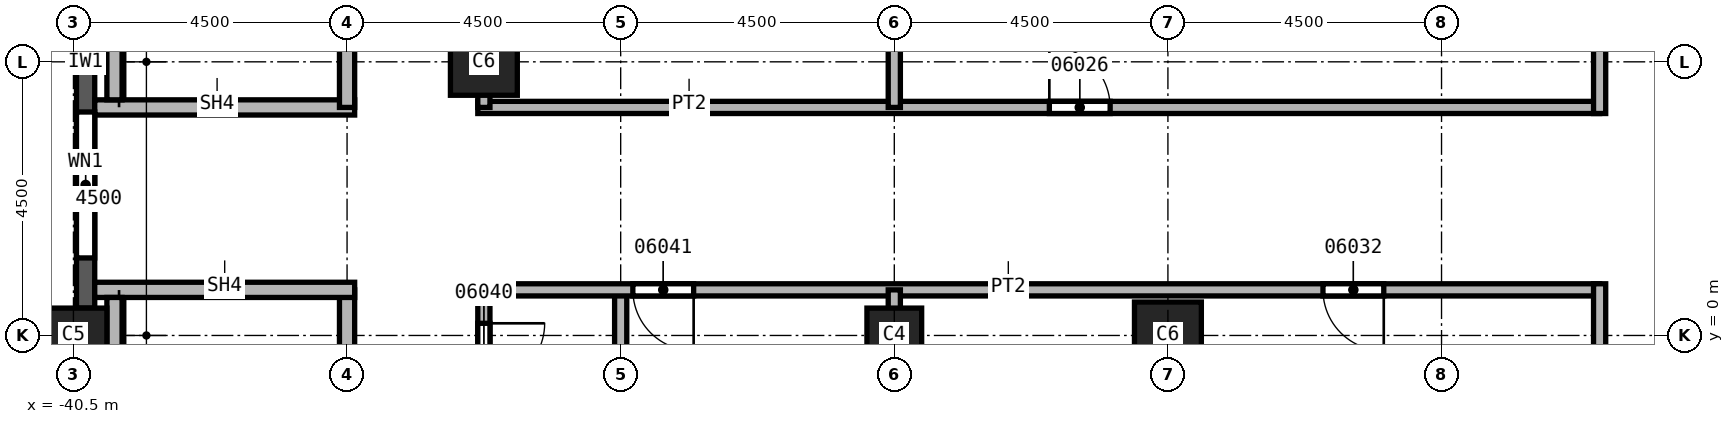
"""IFC4 building model, lengths in metres.
Left out: names, types, materials, properties, quantities, classifications, styles, units other than length and angle.
Written with IfcOpenShell. Run it as: python <this file> out.ifc"""

import sys

from ifc_helpers import new_model, si_unit, direction, frame, frame_2d, origin, origin_2d, place, context, subcontext, project, spatial, rectangle, extrude, element, fill, save


model = new_model("IFC4")
c1 = context("Model", 3, precision=1e-05, world=origin(), true_north=direction((0.0, 1.0)))
c2 = subcontext(c1, "Body", "Model", "MODEL_VIEW")
j1 = project(units=[si_unit("LENGTHUNIT", "METRE"), si_unit("PLANEANGLEUNIT", "RADIAN")], contexts=[c1])
p1 = place(None, origin())
s1 = spatial("IfcSite", under=j1, at=p1, CompositionType="ELEMENT")
p2 = place(p1, origin())
s2 = spatial("IfcBuilding", under=s1, at=p2, CompositionType="ELEMENT")
p3 = place(p2, frame((0.0, 0.0, 126.0)))
s3 = spatial("IfcBuildingStorey", under=s2, at=p3, CompositionType="ELEMENT", Elevation=126.0)
p4 = place(p3, frame((-40.5, 0.0, 0.0), z_axis=(0.0, 0.0, 1.0), x_axis=(0.0, 1.0, 0.0)))
e1 = element("IfcColumn", 1, at=p4, inside=s3, PredefinedType="COLUMN", context=c2, shape_type="SweptSolid", body=[
    extrude(rectangle(XDim=0.9, YDim=1.1, at=origin_2d()), origin(), (0.0, 0.0, 1.0), 3.7),
])
for number, where, z_axis, x_axis in (
    (2, (-33.75, 4.5, 0.0), (0.0, 0.0, 1.0), (1.0, 0.0, 0.0)),
    (3, (-22.5, 0.0, 0.0), (0.0, 0.0, 1.0), (1.0, 0.0, 0.0)),
):
    element("IfcColumn", number, at=place(p3, frame(where, z_axis=z_axis, x_axis=x_axis)), inside=s3, PredefinedType="COLUMN", context=c2, shape_type="SweptSolid", body=[
        extrude(rectangle(XDim=1.1, YDim=1.1, at=origin_2d()), origin(), (0.0, 0.0, 1.0), 3.7),
    ])
p5 = place(p3, frame((-27.0, 0.0, 0.0), z_axis=(0.0, 0.0, 1.0), x_axis=(1.0, 0.0, 0.0)))
e4 = element("IfcColumn", 4, at=p5, inside=s3, PredefinedType="COLUMN", context=c2, shape_type="SweptSolid", body=[
    extrude(rectangle(XDim=0.9, YDim=0.9, at=origin_2d()), origin(), (0.0, 0.0, 1.0), 3.7),
])
p6 = place(p3, frame((-40.3, 8.55, 0.0), z_axis=(0.0, 0.0, 1.0), x_axis=(0.0, -1.0, 0.0)))
e5 = element("IfcWall", 5, at=p6, inside=s3, PredefinedType="SOLIDWALL", context=c2, shape_type="SweptSolid", body=[
    extrude(rectangle(XDim=8.1, YDim=0.3, at=frame_2d((4.05, 0.0))), origin(), (0.0, 0.0, 1.0), 3.1),
])
p7 = place(p6, frame((0.825, 0.0, 0.8)))
e6 = element("IfcOpeningElement", 6, at=p7, cuts=e5, PredefinedType="OPENING", context=c2, shape_type="SweptSolid", body=[
    extrude(rectangle(XDim=2.4, YDim=1.95, at=frame_2d((1.2, 0.975))), frame((0.0, 0.15, 0.0), z_axis=(0.0, -1.0, 0.0), x_axis=(1.0, 0.0, 0.0)), (0.0, 0.0, 1.0), 0.3),
])
p8 = place(p6, frame((4.875, 0.0, 0.8)))
e7 = element("IfcOpeningElement", 7, at=p8, cuts=e5, PredefinedType="OPENING", context=c2, shape_type="SweptSolid", body=[
    extrude(rectangle(XDim=2.4, YDim=1.95, at=frame_2d((1.2, 0.975))), frame((0.0, 0.15, 0.0), z_axis=(0.0, -1.0, 0.0), x_axis=(1.0, 0.0, 0.0)), (0.0, 0.0, 1.0), 0.3),
])
p9 = place(p3, frame((-33.85, 3.75, 0.0), z_axis=(0.0, 0.0, 1.0), x_axis=(1.0, 0.0, 0.0)))
e8 = element("IfcWall", 8, at=p9, inside=s3, PredefinedType="PARTITIONING", context=c2, shape_type="SweptSolid", body=[
    extrude(rectangle(XDim=18.45, YDim=0.2, at=frame_2d((9.225, 0.0))), origin(), (0.0, 0.0, 1.0), 3.7),
])
p10 = place(p9, frame((9.4, 0.0, 0.0)))
e9 = element("IfcOpeningElement", 9, at=p10, cuts=e8, PredefinedType="OPENING", context=c2, shape_type="SweptSolid", body=[
    extrude(rectangle(XDim=1.0, YDim=2.1, at=frame_2d((0.5, 1.05))), frame((0.0, 0.1, 0.0), z_axis=(0.0, -1.0, 0.0), x_axis=(1.0, 0.0, 0.0)), (0.0, 0.0, 1.0), 0.2),
])
p11 = place(p3, frame((-33.75, 0.75, 0.0), z_axis=(0.0, 0.0, 1.0), x_axis=(0.0, -1.0, 0.0)))
e10 = element("IfcWall", 10, at=p11, inside=s3, PredefinedType="PARTITIONING", context=c2, shape_type="SweptSolid", body=[
    extrude(rectangle(XDim=7.6, YDim=0.2, at=frame_2d((3.8, 0.0))), origin(), (0.0, 0.0, 1.0), 3.7),
])
p12 = place(p11, frame((0.55, 0.0, 0.0)))
e11 = element("IfcOpeningElement", 11, at=p12, cuts=e10, PredefinedType="OPENING", context=c2, shape_type="SweptSolid", body=[
    extrude(rectangle(XDim=1.0, YDim=2.1, at=frame_2d((0.5, 1.05))), frame((0.0, 0.1, 0.0), z_axis=(0.0, -1.0, 0.0), x_axis=(1.0, 0.0, 0.0)), (0.0, 0.0, 1.0), 0.2),
])
p13 = place(p3, frame((-33.75, 11.25, 0.0), z_axis=(0.0, 0.0, 1.0), x_axis=(0.0, -1.0, 0.0)))
e12 = element("IfcWall", 12, at=p13, inside=s3, PredefinedType="PARTITIONING", context=c2, shape_type="SweptSolid", body=[
    extrude(rectangle(XDim=7.5, YDim=0.2, at=frame_2d((3.75, 0.0))), origin(), (0.0, 0.0, 1.0), 3.7),
])
p14 = place(p13, frame((1.45, 0.0, 0.0)))
e13 = element("IfcOpeningElement", 13, at=p14, cuts=e12, PredefinedType="OPENING", context=c2, shape_type="SweptSolid", body=[
    extrude(rectangle(XDim=1.0, YDim=2.1, at=frame_2d((0.5, 1.05))), frame((0.0, 0.1, 0.0), z_axis=(0.0, -1.0, 0.0), x_axis=(1.0, 0.0, 0.0)), (0.0, 0.0, 1.0), 0.2),
])
p15 = place(p3, frame((-31.5, 0.75, 0.0), z_axis=(0.0, 0.0, 1.0), x_axis=(0.0, -1.0, 0.0)))
e14 = element("IfcWall", 14, at=p15, inside=s3, PredefinedType="PARTITIONING", context=c2, shape_type="SweptSolid", body=[
    extrude(rectangle(XDim=18.2, YDim=0.2, at=frame_2d((9.1, 0.0))), origin(), (0.0, 0.0, 1.0), 3.7),
])
p16 = place(p3, frame((-15.4, 0.75, 0.0), z_axis=(0.0, 0.0, 1.0), x_axis=(-1.0, 0.0, 0.0)))
e15 = element("IfcWall", 15, at=p16, inside=s3, PredefinedType="PARTITIONING", context=c2, shape_type="SweptSolid", body=[
    extrude(rectangle(XDim=18.45, YDim=0.2, at=frame_2d((9.225, 0.0))), origin(), (0.0, 0.0, 1.0), 3.7),
])
p17 = place(p16, frame((3.55, 0.0, 0.0)))
e16 = element("IfcOpeningElement", 16, at=p17, cuts=e15, PredefinedType="OPENING", context=c2, shape_type="SweptSolid", body=[
    extrude(rectangle(XDim=1.0, YDim=2.1, at=frame_2d((0.5, 1.05))), frame((0.0, 0.1, 0.0), z_axis=(0.0, -1.0, 0.0), x_axis=(1.0, 0.0, 0.0)), (0.0, 0.0, 1.0), 0.2),
])
p18 = place(p16, frame((14.9, 0.0, 0.0)))
e17 = element("IfcOpeningElement", 17, at=p18, cuts=e15, PredefinedType="OPENING", context=c2, shape_type="SweptSolid", body=[
    extrude(rectangle(XDim=1.0, YDim=2.1, at=frame_2d((0.5, 1.05))), frame((0.0, 0.1, 0.0), z_axis=(0.0, -1.0, 0.0), x_axis=(1.0, 0.0, 0.0)), (0.0, 0.0, 1.0), 0.2),
])
p19 = place(p3, frame((-27.0, -17.45, 0.0), z_axis=(0.0, 0.0, 1.0), x_axis=(0.0, 1.0, 0.0)))
e18 = element("IfcWall", 18, at=p19, inside=s3, PredefinedType="PARTITIONING", context=c2, shape_type="SweptSolid", body=[
    extrude(rectangle(XDim=18.2, YDim=0.2, at=frame_2d((9.1, 0.0))), origin(), (0.0, 0.0, 1.0), 3.7),
])
p20 = place(p3, frame((-27.0, 3.75, 0.0), z_axis=(0.0, 0.0, 1.0), x_axis=(0.0, 1.0, 0.0)))
e19 = element("IfcWall", 19, at=p20, inside=s3, PredefinedType="PARTITIONING", context=c2, shape_type="SweptSolid", body=[
    extrude(rectangle(XDim=13.7, YDim=0.2, at=frame_2d((6.85, 0.0))), origin(), (0.0, 0.0, 1.0), 3.7),
])
p21 = place(p3, frame((-15.4, -23.25, 0.0), z_axis=(0.0, 0.0, 1.0), x_axis=(0.0, 1.0, 0.0)))
e20 = element("IfcWall", 20, at=p21, inside=s3, PredefinedType="PARTITIONING", context=c2, shape_type="SweptSolid", body=[
    extrude(rectangle(XDim=24.1, YDim=0.2, at=frame_2d((12.05, 0.0))), origin(), (0.0, 0.0, 1.0), 3.7),
])
p22 = place(p21, frame((4.6, 0.0, 0.0)))
e21 = element("IfcOpeningElement", 21, at=p22, cuts=e20, PredefinedType="OPENING", context=c2, shape_type="SweptSolid", body=[
    extrude(rectangle(XDim=1.0, YDim=2.1, at=frame_2d((0.5, 1.05))), frame((0.0, 0.1, 0.0), z_axis=(0.0, -1.0, 0.0), x_axis=(1.0, 0.0, 0.0)), (0.0, 0.0, 1.0), 0.2),
])
p23 = place(p21, frame((11.8, 0.0, 0.0)))
e22 = element("IfcOpeningElement", 22, at=p23, cuts=e20, PredefinedType="OPENING", context=c2, shape_type="SweptSolid", body=[
    extrude(rectangle(XDim=1.0, YDim=2.1, at=frame_2d((0.5, 1.05))), frame((0.0, 0.1, 0.0), z_axis=(0.0, -1.0, 0.0), x_axis=(1.0, 0.0, 0.0)), (0.0, 0.0, 1.0), 0.2),
])
p24 = place(p21, frame((16.95, 0.0, 0.0)))
e23 = element("IfcOpeningElement", 23, at=p24, cuts=e20, PredefinedType="OPENING", context=c2, shape_type="SweptSolid", body=[
    extrude(rectangle(XDim=1.0, YDim=2.1, at=frame_2d((0.5, 1.05))), frame((0.0, 0.1, 0.0), z_axis=(0.0, -1.0, 0.0), x_axis=(1.0, 0.0, 0.0)), (0.0, 0.0, 1.0), 0.2),
])
p25 = place(p3, frame((-15.4, 3.65, 0.0), z_axis=(0.0, 0.0, 1.0), x_axis=(0.0, 1.0, 0.0)))
e24 = element("IfcWall", 24, at=p25, inside=s3, PredefinedType="PARTITIONING", context=c2, shape_type="SweptSolid", body=[
    extrude(rectangle(XDim=9.95, YDim=0.2, at=frame_2d((4.975, 0.0))), origin(), (0.0, 0.0, 1.0), 3.7),
])
p26 = place(p3, frame((-40.15, 3.75, 0.0), z_axis=(0.0, 0.0, 1.0), x_axis=(1.0, 0.0, 0.0)))
e25 = element("IfcWall", 25, at=p26, inside=s3, PredefinedType="SOLIDWALL", context=c2, shape_type="SweptSolid", body=[
    extrude(rectangle(XDim=4.275, YDim=0.25, at=frame_2d((2.137, 0.0))), origin(), (0.0, 0.0, 1.0), 3.7),
])
p27 = place(p3, frame((-36.0, 0.75, 0.0), z_axis=(0.0, 0.0, 1.0), x_axis=(0.0, -1.0, 0.0)))
e26 = element("IfcWall", 26, at=p27, inside=s3, PredefinedType="SOLIDWALL", context=c2, shape_type="SweptSolid", body=[
    extrude(rectangle(XDim=7.625, YDim=0.25, at=frame_2d((3.812, 0.0))), origin(), (0.0, 0.0, 1.0), 3.7),
])
p28 = place(p27, frame((5.95, 0.0, 0.0)))
e27 = element("IfcOpeningElement", 27, at=p28, cuts=e26, PredefinedType="OPENING", context=c2, shape_type="SweptSolid", body=[
    extrude(rectangle(XDim=1.2, YDim=2.1, at=frame_2d((0.6, 1.05))), frame((0.0, 0.125, 0.0), z_axis=(0.0, -1.0, 0.0), x_axis=(1.0, 0.0, 0.0)), (0.0, 0.0, 1.0), 0.25),
])
p29 = place(p3, frame((-36.0, 11.375, 0.0), z_axis=(0.0, 0.0, 1.0), x_axis=(0.0, -1.0, 0.0)))
e28 = element("IfcWall", 28, at=p29, inside=s3, PredefinedType="SOLIDWALL", context=c2, shape_type="SweptSolid", body=[
    extrude(rectangle(XDim=7.625, YDim=0.25, at=frame_2d((3.812, 0.0))), origin(), (0.0, 0.0, 1.0), 3.7),
])
p30 = place(p29, frame((0.4, 0.0, 0.0)))
e29 = element("IfcOpeningElement", 29, at=p30, cuts=e28, PredefinedType="OPENING", context=c2, shape_type="SweptSolid", body=[
    extrude(rectangle(XDim=1.2, YDim=2.1, at=frame_2d((0.6, 1.05))), frame((0.0, 0.125, 0.0), z_axis=(0.0, -1.0, 0.0), x_axis=(1.0, 0.0, 0.0)), (0.0, 0.0, 1.0), 0.25),
])
p31 = place(p3, frame((-35.875, 0.75, 0.0), z_axis=(0.0, 0.0, 1.0), x_axis=(-1.0, 0.0, 0.0)))
e30 = element("IfcWall", 30, at=p31, inside=s3, PredefinedType="SOLIDWALL", context=c2, shape_type="SweptSolid", body=[
    extrude(rectangle(XDim=4.275, YDim=0.25, at=frame_2d((2.137, 0.0))), origin(), (0.0, 0.0, 1.0), 3.7),
])
for number, where, z_axis, x_axis in (
    (31, (-39.825, 3.875, 0.0), (0.0, 0.0, 1.0), (0.0, 1.0, 0.0)),
    (32, (-39.825, -6.625, 0.0), (0.0, 0.0, 1.0), (0.0, 1.0, 0.0)),
):
    element("IfcWall", number, at=place(p3, frame(where, z_axis=z_axis, x_axis=x_axis)), inside=s3, PredefinedType="SOLIDWALL", context=c2, shape_type="SweptSolid", body=[
        extrude(rectangle(XDim=7.25, YDim=0.25, at=frame_2d((3.625, 0.0))), origin(), (0.0, 0.0, 1.0), 3.7),
    ])
p32 = place(p8, origin())
e33 = element("IfcWindow", 33, at=p32, inside=s3, PartitioningType="SINGLE_PANEL", PredefinedType="WINDOW", context=c2, shape_type="SweptSolid", body=[
    extrude(rectangle(XDim=2.4, YDim=1.95, at=frame_2d((1.2, 0.975))), frame((0.0, 0.03, 0.0), z_axis=(0.0, -1.0, 0.0), x_axis=(1.0, 0.0, 0.0)), (0.0, 0.0, 1.0), 0.06),
])
fill(e7, e33)
p33 = place(p10, origin())
e34 = element("IfcDoor", 34, at=p33, inside=s3, OperationType="SINGLE_SWING_LEFT", PredefinedType="DOOR", context=c2, shape_type="SweptSolid", body=[
    extrude(rectangle(XDim=1.0, YDim=2.1, at=frame_2d((0.5, 1.05))), frame((0.0, 0.025, 0.0), z_axis=(0.0, -1.0, 0.0), x_axis=(1.0, 0.0, 0.0)), (0.0, 0.0, 1.0), 0.05),
])
fill(e9, e34)
p34 = place(p17, origin())
e35 = element("IfcDoor", 35, at=p34, inside=s3, OperationType="SINGLE_SWING_LEFT", PredefinedType="DOOR", context=c2, shape_type="SweptSolid", body=[
    extrude(rectangle(XDim=1.0, YDim=2.1, at=frame_2d((0.5, 1.05))), frame((0.0, 0.025, 0.0), z_axis=(0.0, -1.0, 0.0), x_axis=(1.0, 0.0, 0.0)), (0.0, 0.0, 1.0), 0.05),
])
fill(e16, e35)
p35 = place(p12, origin())
e36 = element("IfcDoor", 36, at=p35, inside=s3, OperationType="SINGLE_SWING_LEFT", PredefinedType="DOOR", context=c2, shape_type="SweptSolid", body=[
    extrude(rectangle(XDim=1.0, YDim=2.1, at=frame_2d((0.5, 1.05))), frame((0.0, 0.025, 0.0), z_axis=(0.0, -1.0, 0.0), x_axis=(1.0, 0.0, 0.0)), (0.0, 0.0, 1.0), 0.05),
])
fill(e11, e36)
p36 = place(p18, origin())
e37 = element("IfcDoor", 37, at=p36, inside=s3, OperationType="SINGLE_SWING_RIGHT", PredefinedType="DOOR", context=c2, shape_type="SweptSolid", body=[
    extrude(rectangle(XDim=1.0, YDim=2.1, at=frame_2d((0.5, 1.05))), frame((0.0, 0.025, 0.0), z_axis=(0.0, -1.0, 0.0), x_axis=(1.0, 0.0, 0.0)), (0.0, 0.0, 1.0), 0.05),
])
fill(e17, e37)
save(model, sys.argv[1])
